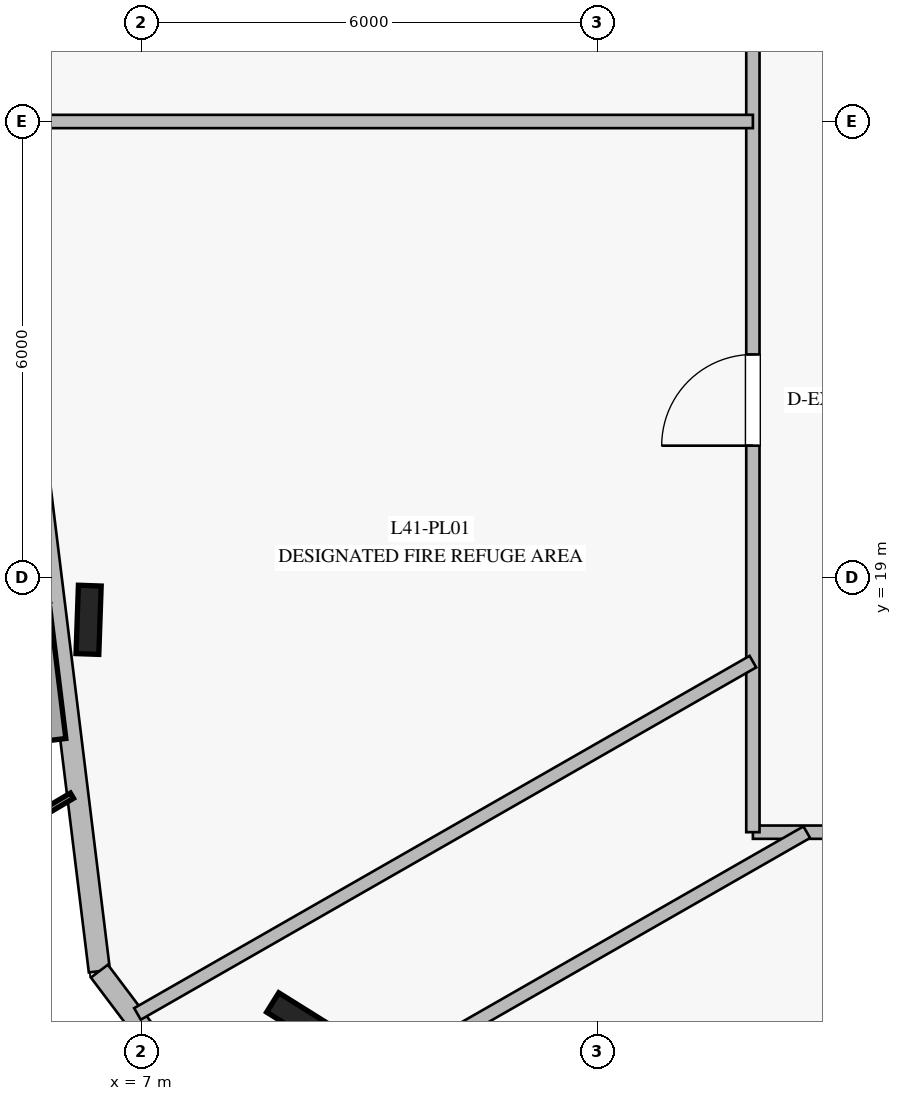
"""IFC4 building model, lengths in metres.
Left out: names, types, materials, properties, quantities, classifications, styles, units other than length and angle.
Written with IfcOpenShell. Run it as: python <this file> out.ifc"""

import sys

from ifc_helpers import new_model, si_unit, direction, frame, frame_2d, origin, origin_2d, place, context, subcontext, project, spatial, rectangle, i_section, extrude, element, fill, save


model = new_model("IFC4")
c1 = context("Model", 3, precision=1e-05, world=origin(), true_north=direction((0.0, 1.0)))
c2 = subcontext(c1, "Body", "Model", "MODEL_VIEW")
j1 = project(units=[si_unit("LENGTHUNIT", "METRE"), si_unit("PLANEANGLEUNIT", "RADIAN")], contexts=[c1])
p1 = place(None, origin())
s1 = spatial("IfcSite", under=j1, at=p1, CompositionType="ELEMENT")
p2 = place(p1, origin())
s2 = spatial("IfcBuilding", under=s1, at=p2, CompositionType="ELEMENT")
p3 = place(p2, frame((0.0, 0.0, 170.4)))
s3 = spatial("IfcBuildingStorey", under=s2, at=p3, CompositionType="ELEMENT", Elevation=170.4)
for number, where, z_axis, x_axis in (
    (1, (6.31, 18.444, 0.0), (0.0, 0.0, 1.0), (0.035, 0.999, 0.0)),
    (2, (9.114, 13.171, 0.0), (0.0, 0.0, 1.0), (-0.848, 0.53, 0.0)),
):
    element("IfcColumn", number, at=place(p3, frame(where, z_axis=z_axis, x_axis=x_axis)), inside=s3, PredefinedType="COLUMN", context=c2, shape_type="SweptSolid", body=[
        extrude(i_section(OverallWidth=0.3, OverallDepth=0.9, WebThickness=0.019, FlangeThickness=0.035, at=origin_2d()), origin(), (0.0, 0.0, 1.0), 5.4),
    ])
p4 = place(p3, frame((4.299, 31.359, 0.0), z_axis=(0.0, 0.0, 1.0), x_axis=(0.121845687451, -0.992549055941, 0.0)))
e3 = element("IfcWall", 3, at=p4, inside=s3, PredefinedType="STANDARD", context=c2, shape_type="SweptSolid", body=[
    extrude(rectangle(XDim=17.668, YDim=0.28, at=frame_2d((8.834, 0.0))), origin(), (0.0, 0.0, 1.0), 5.14),
])
p5 = place(p3, frame((6.452, 13.822, 0.0), z_axis=(0.0, 0.0, 1.0), x_axis=(0.601841660076, -0.798615436989, 0.0)))
e4 = element("IfcWall", 4, at=p5, inside=s3, PredefinedType="STANDARD", context=c2, shape_type="SweptSolid", body=[
    extrude(rectangle(XDim=4.471, YDim=0.28, at=frame_2d((2.236, 0.0))), origin(), (0.0, 0.0, 1.0), 5.14),
])
p6 = place(p3, frame((34.95, 15.65, 0.0), z_axis=(0.0, 0.0, 1.0), x_axis=(-1.0, 0.0, 0.0)))
e5 = element("IfcWall", 5, at=p6, inside=s3, PredefinedType="PARTITIONING", context=c2, shape_type="SweptSolid", body=[
    extrude(rectangle(XDim=19.9, YDim=0.175, at=frame_2d((9.95, 0.0))), origin(), (0.0, 0.0, 1.0), 3.54),
])
p7 = place(p6, frame((9.611, 0.0, 0.0)))
e6 = element("IfcOpeningElement", 6, at=p7, cuts=e5, PredefinedType="OPENING", context=c2, shape_type="SweptSolid", body=[
    extrude(rectangle(XDim=1.15, YDim=2.2, at=frame_2d((0.575, 1.1))), frame((0.0, 0.098, 0.0), z_axis=(0.0, -1.0, 0.0), x_axis=(1.0, 0.0, 0.0)), (0.0, 0.0, 1.0), 0.195),
])
p8 = place(p3, frame((15.05, 15.65, 0.0), z_axis=(0.0, 0.0, 1.0), x_axis=(0.0, 1.0, 0.0)))
e7 = element("IfcWall", 7, at=p8, inside=s3, PredefinedType="PARTITIONING", context=c2, shape_type="SweptSolid", body=[
    extrude(rectangle(XDim=18.7, YDim=0.175, at=frame_2d((9.35, 0.0))), origin(), (0.0, 0.0, 1.0), 3.54),
])
p9 = place(p8, frame((5.085, 0.0, 0.0)))
e8 = element("IfcOpeningElement", 8, at=p9, cuts=e7, PredefinedType="OPENING", context=c2, shape_type="SweptSolid", body=[
    extrude(rectangle(XDim=1.2, YDim=2.25, at=frame_2d((0.6, 1.125))), frame((0.0, 0.098, 0.0), z_axis=(0.0, -1.0, 0.0), x_axis=(1.0, 0.0, 0.0)), (0.0, 0.0, 1.0), 0.195),
])
p10 = place(p8, frame((12.525, 0.0, 0.0)))
e9 = element("IfcOpeningElement", 9, at=p10, cuts=e7, PredefinedType="OPENING", context=c2, shape_type="SweptSolid", body=[
    extrude(rectangle(XDim=1.15, YDim=2.2, at=frame_2d((0.575, 1.1))), frame((0.0, 0.098, 0.0), z_axis=(0.0, -1.0, 0.0), x_axis=(1.0, 0.0, 0.0)), (0.0, 0.0, 1.0), 0.195),
])
p11 = place(p3, frame((15.05, 17.894, 0.0), z_axis=(0.0, 0.0, 1.0), x_axis=(-0.867870917182, -0.496789765504, 0.0)))
e10 = element("IfcWall", 10, at=p11, inside=s3, PredefinedType="PARTITIONING", context=c2, shape_type="SweptSolid", body=[
    extrude(rectangle(XDim=9.33, YDim=0.175, at=frame_2d((4.665, 0.0))), origin(), (0.0, 0.0, 1.0), 3.53),
])
p12 = place(p3, frame((15.759, 15.65, 0.0), z_axis=(0.0, 0.0, 1.0), x_axis=(-0.86783997446, -0.49684381724, 0.0)))
e11 = element("IfcWall", 11, at=p12, inside=s3, PredefinedType="PARTITIONING", context=c2, shape_type="SweptSolid", body=[
    extrude(rectangle(XDim=8.54, YDim=0.175, at=frame_2d((4.27, 0.0))), origin(), (0.0, 0.0, 1.0), 3.53),
])
p13 = place(p3, frame((15.05, 25.0, 0.0), z_axis=(0.0, 0.0, 1.0), x_axis=(-1.0, 0.0, 0.0)))
e12 = element("IfcWall", 12, at=p13, inside=s3, PredefinedType="PARTITIONING", context=c2, shape_type="SweptSolid", body=[
    extrude(rectangle(XDim=9.898, YDim=0.175, at=frame_2d((4.949, 0.0))), origin(), (0.0, 0.0, 1.0), 3.53),
])
p14 = place(p9, origin())
e13 = element("IfcDoor", 13, at=p14, inside=s3, OperationType="SINGLE_SWING_LEFT", PredefinedType="DOOR", context=c2, shape_type="SweptSolid", body=[
    extrude(rectangle(XDim=1.2, YDim=2.25, at=frame_2d((0.6, 1.125))), frame((0.0, 0.025, 0.0), z_axis=(0.0, -1.0, 0.0), x_axis=(1.0, 0.0, 0.0)), (0.0, 0.0, 1.0), 0.05),
])
fill(e8, e13)
save(model, sys.argv[1])
